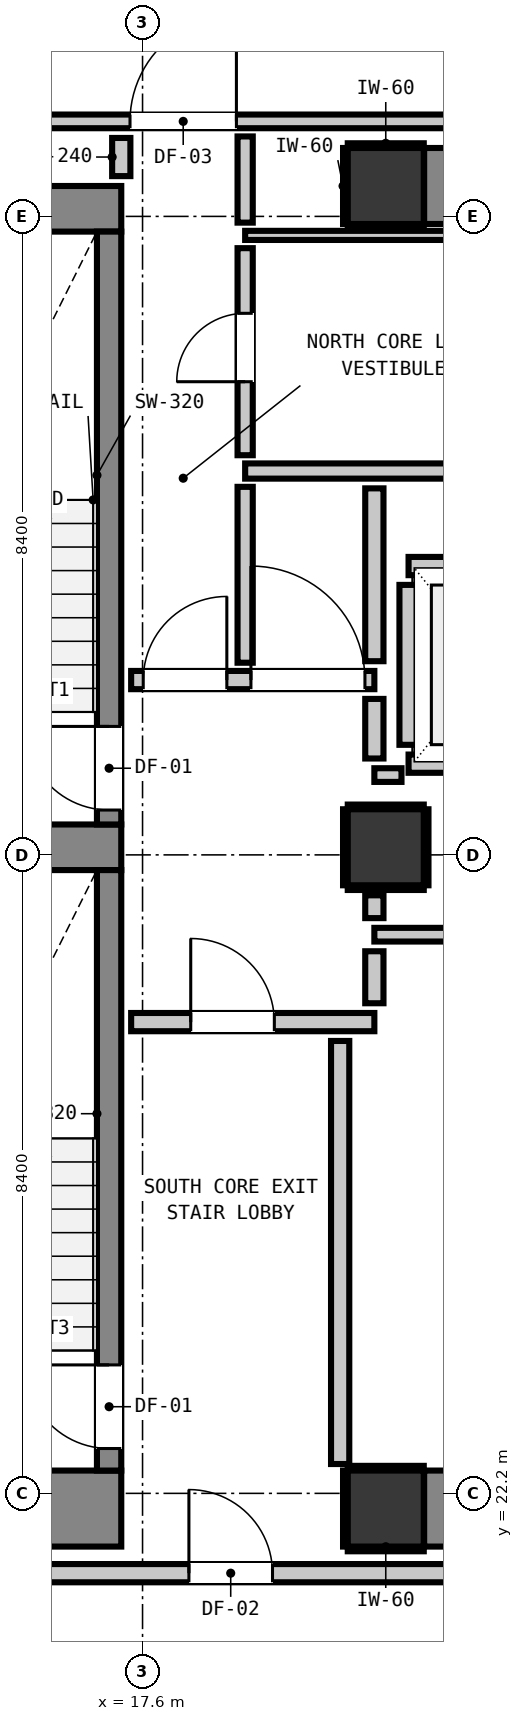
"""IFC4 building model, lengths in metres.
Left out: names, types, materials, properties, quantities, classifications, styles, units other than length and angle.
Written with IfcOpenShell. Run it as: python <this file> out.ifc"""

import sys

from ifc_helpers import new_model, si_unit, direction, frame, frame_2d, origin, origin_2d, place, context, subcontext, project, spatial, rectangle, extrude, element, fill, save


model = new_model("IFC4")
c1 = context("Model", 3, precision=1e-05, world=origin(), true_north=direction((0.0, 1.0)))
c2 = subcontext(c1, "Body", "Model", "MODEL_VIEW")
j1 = project(units=[si_unit("LENGTHUNIT", "METRE"), si_unit("PLANEANGLEUNIT", "RADIAN")], contexts=[c1])
p1 = place(None, origin())
s1 = spatial("IfcSite", under=j1, at=p1, CompositionType="ELEMENT")
p2 = place(p1, origin())
s2 = spatial("IfcBuilding", under=s1, at=p2, CompositionType="ELEMENT")
p3 = place(p2, frame((0.0, 0.0, 106.08)))
s3 = spatial("IfcBuildingStorey", under=s2, at=p3, CompositionType="ELEMENT", Elevation=106.08)
for number, where, z_axis, x_axis in (
    (1, (20.8, 22.0, 0.0), (0.0, 0.0, 1.0), (1.0, 0.0, 0.0)),
    (2, (20.8, 39.4, 0.0), (0.0, 0.0, 1.0), (1.0, 0.0, 0.0)),
):
    element("IfcColumn", number, at=place(p3, frame(where, z_axis=z_axis, x_axis=x_axis)), inside=s3, PredefinedType="COLUMN", context=c2, shape_type="SweptSolid", body=[
        extrude(rectangle(XDim=1.0, YDim=1.0, at=origin_2d()), origin(), (0.0, 0.0, 1.0), 3.32),
    ])
p4 = place(p3, frame((13.24, 22.0, 0.0), z_axis=(0.0, 0.0, 1.0), x_axis=(1.0, 0.0, 0.0)))
e3 = element("IfcWall", 3, at=p4, inside=s3, PredefinedType="SHEAR", context=c2, shape_type="SweptSolid", body=[
    extrude(rectangle(XDim=4.08, YDim=1.0, at=frame_2d((2.04, 0.0))), origin(), (0.0, 0.0, 1.0), 3.32),
])
p5 = place(p3, frame((13.24, 39.1, 0.0), z_axis=(0.0, 0.0, 1.0), x_axis=(1.0, 0.0, 0.0)))
e4 = element("IfcWall", 4, at=p5, inside=s3, PredefinedType="SHEAR", context=c2, shape_type="SweptSolid", body=[
    extrude(rectangle(XDim=4.08, YDim=0.6, at=frame_2d((2.04, 0.0))), origin(), (0.0, 0.0, 1.0), 3.32),
])
p6 = place(p3, frame((13.905, 30.7, 0.0), z_axis=(0.0, 0.0, 1.0), x_axis=(1.0, 0.0, 0.0)))
e5 = element("IfcWall", 5, at=p6, inside=s3, PredefinedType="SHEAR", context=c2, shape_type="SweptSolid", body=[
    extrude(rectangle(XDim=3.415, YDim=0.6, at=frame_2d((1.708, 0.0))), origin(), (0.0, 0.0, 1.0), 3.32),
])
for number, where, z_axis, x_axis in (
    (6, (21.305, 22.0, 0.0), (0.0, 0.0, 1.0), (1.0, 0.0, 0.0)),
    (7, (21.305, 39.4, 0.0), (0.0, 0.0, 1.0), (1.0, 0.0, 0.0)),
):
    element("IfcWall", number, at=place(p3, frame(where, z_axis=z_axis, x_axis=x_axis)), inside=s3, PredefinedType="SHEAR", context=c2, shape_type="SweptSolid", body=[
        extrude(rectangle(XDim=7.39, YDim=1.0, at=frame_2d((3.695, 0.0))), origin(), (0.0, 0.0, 1.0), 3.32),
    ])
p7 = place(p3, frame((17.16, 31.0, 0.0), z_axis=(0.0, 0.0, 1.0), x_axis=(0.0, 1.0, 0.0)))
e8 = element("IfcWall", 8, at=p7, inside=s3, PredefinedType="SHEAR", context=c2, shape_type="SweptSolid", body=[
    extrude(rectangle(XDim=7.8, YDim=0.32, at=frame_2d((3.9, 0.0))), origin(), (0.0, 0.0, 1.0), 3.32),
])
p8 = place(p7, frame((0.19, 0.0, 0.0)))
e9 = element("IfcOpeningElement", 9, at=p8, cuts=e8, PredefinedType="OPENING", context=c2, shape_type="SweptSolid", body=[
    extrude(rectangle(XDim=1.1, YDim=2.15, at=frame_2d((0.55, 1.075))), frame((0.0, 0.17, 0.0), z_axis=(0.0, -1.0, 0.0), x_axis=(1.0, 0.0, 0.0)), (0.0, 0.0, 1.0), 0.34),
])
p9 = place(p3, frame((17.16, 22.5, 0.0), z_axis=(0.0, 0.0, 1.0), x_axis=(0.0, 1.0, 0.0)))
e10 = element("IfcWall", 10, at=p9, inside=s3, PredefinedType="SHEAR", context=c2, shape_type="SweptSolid", body=[
    extrude(rectangle(XDim=7.9, YDim=0.32, at=frame_2d((3.95, 0.0))), origin(), (0.0, 0.0, 1.0), 3.32),
])
p10 = place(p9, frame((0.29, 0.0, 0.0)))
e11 = element("IfcOpeningElement", 11, at=p10, cuts=e10, PredefinedType="OPENING", context=c2, shape_type="SweptSolid", body=[
    extrude(rectangle(XDim=1.1, YDim=2.15, at=frame_2d((0.55, 1.075))), frame((0.0, 0.17, 0.0), z_axis=(0.0, -1.0, 0.0), x_axis=(1.0, 0.0, 0.0)), (0.0, 0.0, 1.0), 0.34),
])
p11 = place(p3, frame((20.8, 30.7, 0.0), z_axis=(0.0, 0.0, 1.0), x_axis=(1.0, 0.0, 0.0)))
e12 = element("IfcColumn", 12, at=p11, inside=s3, PredefinedType="COLUMN", context=c2, shape_type="SweptSolid", body=[
    extrude(rectangle(XDim=1.0, YDim=1.0, at=origin_2d()), origin(), (0.0, 0.0, 1.0), 3.32),
])
for number, where, z_axis, x_axis in (
    (13, (21.1, 31.8, 0.0), (0.0, 0.0, 1.0), (1.0, 0.0, 0.0)),
    (14, (21.1, 34.4, 0.0), (0.0, 0.0, 1.0), (1.0, 0.0, 0.0)),
):
    element("IfcWall", number, at=place(p3, frame(where, z_axis=z_axis, x_axis=x_axis)), inside=s3, PredefinedType="PARTITIONING", context=c2, shape_type="SweptSolid", body=[
        extrude(rectangle(XDim=2.2, YDim=0.24, at=frame_2d((1.1, 0.0))), origin(), (0.0, 0.0, 1.0), 3.08),
    ])
p12 = place(p3, frame((21.1, 32.048, 0.0), z_axis=(0.0, 0.0, 1.0), x_axis=(0.0, 1.0, 0.0)))
e15 = element("IfcWall", 15, at=p12, inside=s3, PredefinedType="PARTITIONING", context=c2, shape_type="SweptSolid", body=[
    extrude(rectangle(XDim=2.104, YDim=0.24, at=frame_2d((1.052, 0.0))), origin(), (0.0, 0.0, 1.0), 2.315),
])
p13 = place(p3, frame((3.207, 21.15, 0.0), z_axis=(0.0, 0.0, 1.0), x_axis=(1.0, 0.0, 0.0)))
e16 = element("IfcWall", 16, at=p13, inside=s3, PredefinedType="PARTITIONING", context=c2, shape_type="SweptSolid", body=[
    extrude(rectangle(XDim=39.386, YDim=0.24, at=frame_2d((19.693, 0.0))), origin(), (0.0, 0.0, 1.0), 3.08),
])
p14 = place(p13, frame((15.003, 0.0, 0.0)))
e17 = element("IfcOpeningElement", 17, at=p14, cuts=e16, PredefinedType="OPENING", context=c2, shape_type="SweptSolid", body=[
    extrude(rectangle(XDim=1.1, YDim=2.15, at=frame_2d((0.55, 1.075))), frame((0.0, 0.13, 0.0), z_axis=(0.0, -1.0, 0.0), x_axis=(1.0, 0.0, 0.0)), (0.0, 0.0, 1.0), 0.26),
])
p15 = place(p13, frame((7.243, 0.0, 0.0)))
e18 = element("IfcOpeningElement", 18, at=p15, cuts=e16, PredefinedType="OPENING", context=c2, shape_type="SweptSolid", body=[
    extrude(rectangle(XDim=1.4, YDim=2.15, at=frame_2d((0.7, 1.075))), frame((0.0, 0.13, 0.0), z_axis=(0.0, -1.0, 0.0), x_axis=(1.0, 0.0, 0.0)), (0.0, 0.0, 1.0), 0.26),
])
p16 = place(p13, frame((34.843, 0.0, 0.0)))
e19 = element("IfcOpeningElement", 19, at=p16, cuts=e16, PredefinedType="OPENING", context=c2, shape_type="SweptSolid", body=[
    extrude(rectangle(XDim=1.4, YDim=2.15, at=frame_2d((0.7, 1.075))), frame((0.0, 0.13, 0.0), z_axis=(0.0, -1.0, 0.0), x_axis=(1.0, 0.0, 0.0)), (0.0, 0.0, 1.0), 0.26),
])
p17 = place(p3, frame((17.45, 28.4, 0.0), z_axis=(0.0, 0.0, 1.0), x_axis=(1.0, 0.0, 0.0)))
e20 = element("IfcWall", 20, at=p17, inside=s3, PredefinedType="PARTITIONING", context=c2, shape_type="SweptSolid", body=[
    extrude(rectangle(XDim=3.2, YDim=0.24, at=frame_2d((1.6, 0.0))), origin(), (0.0, 0.0, 1.0), 3.08),
])
p18 = place(p17, frame((0.784, 0.0, 0.0)))
e21 = element("IfcOpeningElement", 21, at=p18, cuts=e20, PredefinedType="OPENING", context=c2, shape_type="SweptSolid", body=[
    extrude(rectangle(XDim=1.1, YDim=2.15, at=frame_2d((0.55, 1.075))), frame((0.0, 0.13, 0.0), z_axis=(0.0, -1.0, 0.0), x_axis=(1.0, 0.0, 0.0)), (0.0, 0.0, 1.0), 0.26),
])
p19 = place(p3, frame((17.45, 32.9, 0.0), z_axis=(0.0, 0.0, 1.0), x_axis=(1.0, 0.0, 0.0)))
e22 = element("IfcWall", 22, at=p19, inside=s3, PredefinedType="PARTITIONING", context=c2, shape_type="SweptSolid", body=[
    extrude(rectangle(XDim=3.2, YDim=0.24, at=frame_2d((1.6, 0.0))), origin(), (0.0, 0.0, 1.0), 3.08),
])
p20 = place(p19, frame((0.159, 0.0, 0.0)))
e23 = element("IfcOpeningElement", 23, at=p20, cuts=e22, PredefinedType="OPENING", context=c2, shape_type="SweptSolid", body=[
    extrude(rectangle(XDim=1.1, YDim=2.15, at=frame_2d((0.55, 1.075))), frame((0.0, 0.13, 0.0), z_axis=(0.0, -1.0, 0.0), x_axis=(1.0, 0.0, 0.0)), (0.0, 0.0, 1.0), 0.26),
])
p21 = place(p19, frame((1.576, 0.0, 0.0)))
e24 = element("IfcOpeningElement", 24, at=p21, cuts=e22, PredefinedType="OPENING", context=c2, shape_type="SweptSolid", body=[
    extrude(rectangle(XDim=1.5, YDim=2.15, at=frame_2d((0.75, 1.075))), frame((0.0, 0.13, 0.0), z_axis=(0.0, -1.0, 0.0), x_axis=(1.0, 0.0, 0.0)), (0.0, 0.0, 1.0), 0.26),
])
p22 = place(p3, frame((18.95, 35.65, 0.0), z_axis=(0.0, 0.0, 1.0), x_axis=(1.0, 0.0, 0.0)))
e25 = element("IfcWall", 25, at=p22, inside=s3, PredefinedType="PARTITIONING", context=c2, shape_type="SweptSolid", body=[
    extrude(rectangle(XDim=11.025, YDim=0.2, at=frame_2d((5.513, 0.0))), origin(), (0.0, 0.0, 1.0), 3.08),
])
p23 = place(p3, frame((20.65, 29.55, 0.0), z_axis=(0.0, 0.0, 1.0), x_axis=(1.0, 0.0, 0.0)))
e26 = element("IfcWall", 26, at=p23, inside=s3, PredefinedType="PARTITIONING", context=c2, shape_type="SweptSolid", body=[
    extrude(rectangle(XDim=9.325, YDim=0.18, at=frame_2d((4.663, 0.0))), origin(), (0.0, 0.0, 1.0), 3.08),
])
p24 = place(p3, frame((20.65, 31.65, 0.0), z_axis=(0.0, 0.0, 1.0), x_axis=(1.0, 0.0, 0.0)))
e27 = element("IfcWall", 27, at=p24, inside=s3, PredefinedType="PARTITIONING", context=c2, shape_type="SweptSolid", body=[
    extrude(rectangle(XDim=0.357, YDim=0.18, at=frame_2d((0.179, 0.0))), origin(), (0.0, 0.0, 1.0), 3.08),
])
p25 = place(p3, frame((12.979, 40.25, 0.0), z_axis=(0.0, 0.0, 1.0), x_axis=(1.0, 0.0, 0.0)))
e28 = element("IfcWall", 28, at=p25, inside=s3, PredefinedType="PARTITIONING", context=c2, shape_type="SweptSolid", body=[
    extrude(rectangle(XDim=29.614, YDim=0.18, at=frame_2d((14.807, 0.0))), origin(), (0.0, 0.0, 1.0), 3.08),
])
p26 = place(p25, frame((4.456, 0.0, 0.0)))
e29 = element("IfcOpeningElement", 29, at=p26, cuts=e28, PredefinedType="OPENING", context=c2, shape_type="SweptSolid", body=[
    extrude(rectangle(XDim=1.4, YDim=2.15, at=frame_2d((0.7, 1.075))), frame((0.0, 0.1, 0.0), z_axis=(0.0, -1.0, 0.0), x_axis=(1.0, 0.0, 0.0)), (0.0, 0.0, 1.0), 0.2),
])
p27 = place(p25, frame((25.071, 0.0, 0.0)))
e30 = element("IfcOpeningElement", 30, at=p27, cuts=e28, PredefinedType="OPENING", context=c2, shape_type="SweptSolid", body=[
    extrude(rectangle(XDim=1.4, YDim=2.15, at=frame_2d((0.7, 1.075))), frame((0.0, 0.1, 0.0), z_axis=(0.0, -1.0, 0.0), x_axis=(1.0, 0.0, 0.0)), (0.0, 0.0, 1.0), 0.2),
])
p28 = place(p3, frame((18.95, 38.75, 0.0), z_axis=(0.0, 0.0, 1.0), x_axis=(1.0, 0.0, 0.0)))
e31 = element("IfcWall", 31, at=p28, inside=s3, PredefinedType="PARTITIONING", context=c2, shape_type="SweptSolid", body=[
    extrude(rectangle(XDim=13.56, YDim=0.12, at=frame_2d((6.78, 0.0))), origin(), (0.0, 0.0, 1.0), 3.08),
])
p29 = place(p3, frame((17.32, 39.53, 0.0), z_axis=(0.0, 0.0, 1.0), x_axis=(0.0, 1.0, 0.0)))
e32 = element("IfcWall", 32, at=p29, inside=s3, PredefinedType="PARTITIONING", context=c2, shape_type="SweptSolid", body=[
    extrude(rectangle(XDim=0.502, YDim=0.24, at=frame_2d((0.251, 0.0))), origin(), (0.0, 0.0, 1.0), 3.08),
])
p30 = place(p3, frame((20.2, 22.586, 0.0), z_axis=(0.0, 0.0, 1.0), x_axis=(0.0, 1.0, 0.0)))
e33 = element("IfcWall", 33, at=p30, inside=s3, PredefinedType="PARTITIONING", context=c2, shape_type="SweptSolid", body=[
    extrude(rectangle(XDim=5.566, YDim=0.24, at=frame_2d((2.783, 0.0))), origin(), (0.0, 0.0, 1.0), 3.08),
])
p31 = place(p3, frame((20.65, 28.648, 0.0), z_axis=(0.0, 0.0, 1.0), x_axis=(0.0, 1.0, 0.0)))
e34 = element("IfcWall", 34, at=p31, inside=s3, PredefinedType="PARTITIONING", context=c2, shape_type="SweptSolid", body=[
    extrude(rectangle(XDim=0.684, YDim=0.24, at=frame_2d((0.342, 0.0))), origin(), (0.0, 0.0, 1.0), 2.315),
])
p32 = place(p3, frame((20.65, 29.768, 0.0), z_axis=(0.0, 0.0, 1.0), x_axis=(0.0, 1.0, 0.0)))
e35 = element("IfcWall", 35, at=p32, inside=s3, PredefinedType="PARTITIONING", context=c2, shape_type="SweptSolid", body=[
    extrude(rectangle(XDim=0.3, YDim=0.24, at=frame_2d((0.15, 0.0))), origin(), (0.0, 0.0, 1.0), 2.315),
])
p33 = place(p3, frame((20.65, 31.868, 0.0), z_axis=(0.0, 0.0, 1.0), x_axis=(0.0, 1.0, 0.0)))
e36 = element("IfcWall", 36, at=p33, inside=s3, PredefinedType="PARTITIONING", context=c2, shape_type="SweptSolid", body=[
    extrude(rectangle(XDim=0.784, YDim=0.24, at=frame_2d((0.392, 0.0))), origin(), (0.0, 0.0, 1.0), 2.315),
])
p34 = place(p3, frame((20.65, 33.148, 0.0), z_axis=(0.0, 0.0, 1.0), x_axis=(0.0, 1.0, 0.0)))
e37 = element("IfcWall", 37, at=p34, inside=s3, PredefinedType="PARTITIONING", context=c2, shape_type="SweptSolid", body=[
    extrude(rectangle(XDim=2.274, YDim=0.24, at=frame_2d((1.137, 0.0))), origin(), (0.0, 0.0, 1.0), 2.315),
])
p35 = place(p3, frame((18.95, 33.128, 0.0), z_axis=(0.0, 0.0, 1.0), x_axis=(0.0, 1.0, 0.0)))
e38 = element("IfcWall", 38, at=p35, inside=s3, PredefinedType="PARTITIONING", context=c2, shape_type="SweptSolid", body=[
    extrude(rectangle(XDim=2.314, YDim=0.2, at=frame_2d((1.157, 0.0))), origin(), (0.0, 0.0, 1.0), 3.08),
])
p36 = place(p3, frame((18.95, 35.858, 0.0), z_axis=(0.0, 0.0, 1.0), x_axis=(0.0, 1.0, 0.0)))
e39 = element("IfcWall", 39, at=p36, inside=s3, PredefinedType="PARTITIONING", context=c2, shape_type="SweptSolid", body=[
    extrude(rectangle(XDim=2.724, YDim=0.2, at=frame_2d((1.362, 0.0))), origin(), (0.0, 0.0, 1.0), 3.08),
])
p37 = place(p36, frame((0.967, 0.0, 0.0)))
e40 = element("IfcOpeningElement", 40, at=p37, cuts=e39, PredefinedType="OPENING", context=c2, shape_type="SweptSolid", body=[
    extrude(rectangle(XDim=0.9, YDim=2.1, at=frame_2d((0.45, 1.05))), frame((0.0, 0.11, 0.0), z_axis=(0.0, -1.0, 0.0), x_axis=(1.0, 0.0, 0.0)), (0.0, 0.0, 1.0), 0.22),
])
p38 = place(p3, frame((18.95, 38.918, 0.0), z_axis=(0.0, 0.0, 1.0), x_axis=(0.0, 1.0, 0.0)))
e41 = element("IfcWall", 41, at=p38, inside=s3, PredefinedType="PARTITIONING", context=c2, shape_type="SweptSolid", body=[
    extrude(rectangle(XDim=1.134, YDim=0.2, at=frame_2d((0.567, 0.0))), origin(), (0.0, 0.0, 1.0), 3.08),
])
for number, where, z_axis, x_axis in (
    (42, (20.3, 21.468, 0.0), (0.0, 0.0, 1.0), (1.0, 0.0, 0.0)),
    (43, (20.3, 22.532, 0.0), (0.0, 0.0, 1.0), (1.0, 0.0, 0.0)),
    (44, (20.268, 21.5, 0.0), (0.0, 0.0, 1.0), (0.0, 1.0, 0.0)),
    (45, (20.3, 38.868, 0.0), (0.0, 0.0, 1.0), (1.0, 0.0, 0.0)),
    (46, (20.3, 39.932, 0.0), (0.0, 0.0, 1.0), (1.0, 0.0, 0.0)),
    (47, (20.268, 38.9, 0.0), (0.0, 0.0, 1.0), (0.0, 1.0, 0.0)),
    (48, (20.3, 30.168, 0.0), (0.0, 0.0, 1.0), (1.0, 0.0, 0.0)),
    (49, (20.3, 31.232, 0.0), (0.0, 0.0, 1.0), (1.0, 0.0, 0.0)),
    (50, (20.268, 30.2, 0.0), (0.0, 0.0, 1.0), (0.0, 1.0, 0.0)),
    (51, (21.332, 30.2, 0.0), (0.0, 0.0, 1.0), (0.0, 1.0, 0.0)),
):
    element("IfcWall", number, at=place(p3, frame(where, z_axis=z_axis, x_axis=x_axis)), inside=s3, PredefinedType="PARTITIONING", context=c2, shape_type="SweptSolid", body=[
        extrude(rectangle(XDim=1.0, YDim=0.06, at=frame_2d((0.5, 0.0))), origin(), (0.0, 0.0, 1.0), 1.45),
    ])
p39 = place(p8, origin())
e52 = element("IfcDoor", 52, at=p39, inside=s3, OperationType="SINGLE_SWING_RIGHT", PredefinedType="DOOR", context=c2, shape_type="SweptSolid", body=[
    extrude(rectangle(XDim=1.1, YDim=2.15, at=frame_2d((0.55, 1.075))), frame((0.0, 0.025, 0.0), z_axis=(0.0, -1.0, 0.0), x_axis=(1.0, 0.0, 0.0)), (0.0, 0.0, 1.0), 0.05),
])
fill(e9, e52)
p40 = place(p10, origin())
e53 = element("IfcDoor", 53, at=p40, inside=s3, OperationType="SINGLE_SWING_RIGHT", PredefinedType="DOOR", context=c2, shape_type="SweptSolid", body=[
    extrude(rectangle(XDim=1.1, YDim=2.15, at=frame_2d((0.55, 1.075))), frame((0.0, 0.025, 0.0), z_axis=(0.0, -1.0, 0.0), x_axis=(1.0, 0.0, 0.0)), (0.0, 0.0, 1.0), 0.05),
])
fill(e11, e53)
p41 = place(p18, origin())
e54 = element("IfcDoor", 54, at=p41, inside=s3, OperationType="SINGLE_SWING_LEFT", PredefinedType="DOOR", context=c2, shape_type="SweptSolid", body=[
    extrude(rectangle(XDim=1.1, YDim=2.15, at=frame_2d((0.55, 1.075))), frame((0.0, 0.025, 0.0), z_axis=(0.0, -1.0, 0.0), x_axis=(1.0, 0.0, 0.0)), (0.0, 0.0, 1.0), 0.05),
])
fill(e21, e54)
p42 = place(p20, origin())
e55 = element("IfcDoor", 55, at=p42, inside=s3, OperationType="SINGLE_SWING_RIGHT", PredefinedType="DOOR", context=c2, shape_type="SweptSolid", body=[
    extrude(rectangle(XDim=1.1, YDim=2.15, at=frame_2d((0.55, 1.075))), frame((0.0, 0.025, 0.0), z_axis=(0.0, -1.0, 0.0), x_axis=(1.0, 0.0, 0.0)), (0.0, 0.0, 1.0), 0.05),
])
fill(e23, e55)
p43 = place(p14, origin())
e56 = element("IfcDoor", 56, at=p43, inside=s3, OperationType="SINGLE_SWING_LEFT", PredefinedType="DOOR", context=c2, shape_type="SweptSolid", body=[
    extrude(rectangle(XDim=1.1, YDim=2.15, at=frame_2d((0.55, 1.075))), frame((0.0, 0.025, 0.0), z_axis=(0.0, -1.0, 0.0), x_axis=(1.0, 0.0, 0.0)), (0.0, 0.0, 1.0), 0.05),
])
fill(e17, e56)
p44 = place(p26, origin())
e57 = element("IfcDoor", 57, at=p44, inside=s3, OperationType="SINGLE_SWING_RIGHT", PredefinedType="DOOR", context=c2, shape_type="SweptSolid", body=[
    extrude(rectangle(XDim=1.4, YDim=2.15, at=frame_2d((0.7, 1.075))), frame((0.0, 0.025, 0.0), z_axis=(0.0, -1.0, 0.0), x_axis=(1.0, 0.0, 0.0)), (0.0, 0.0, 1.0), 0.05),
])
fill(e29, e57)
p45 = place(p21, origin())
e58 = element("IfcDoor", 58, at=p45, inside=s3, OperationType="SINGLE_SWING_LEFT", PredefinedType="DOOR", context=c2, shape_type="SweptSolid", body=[
    extrude(rectangle(XDim=1.5, YDim=2.15, at=frame_2d((0.75, 1.075))), frame((0.0, 0.025, 0.0), z_axis=(0.0, -1.0, 0.0), x_axis=(1.0, 0.0, 0.0)), (0.0, 0.0, 1.0), 0.05),
])
fill(e24, e58)
p46 = place(p37, origin())
e59 = element("IfcDoor", 59, at=p46, inside=s3, OperationType="SINGLE_SWING_LEFT", PredefinedType="DOOR", context=c2, shape_type="SweptSolid", body=[
    extrude(rectangle(XDim=0.9, YDim=2.1, at=frame_2d((0.45, 1.05))), frame((0.0, 0.025, 0.0), z_axis=(0.0, -1.0, 0.0), x_axis=(1.0, 0.0, 0.0)), (0.0, 0.0, 1.0), 0.05),
])
fill(e40, e59)
save(model, sys.argv[1])
